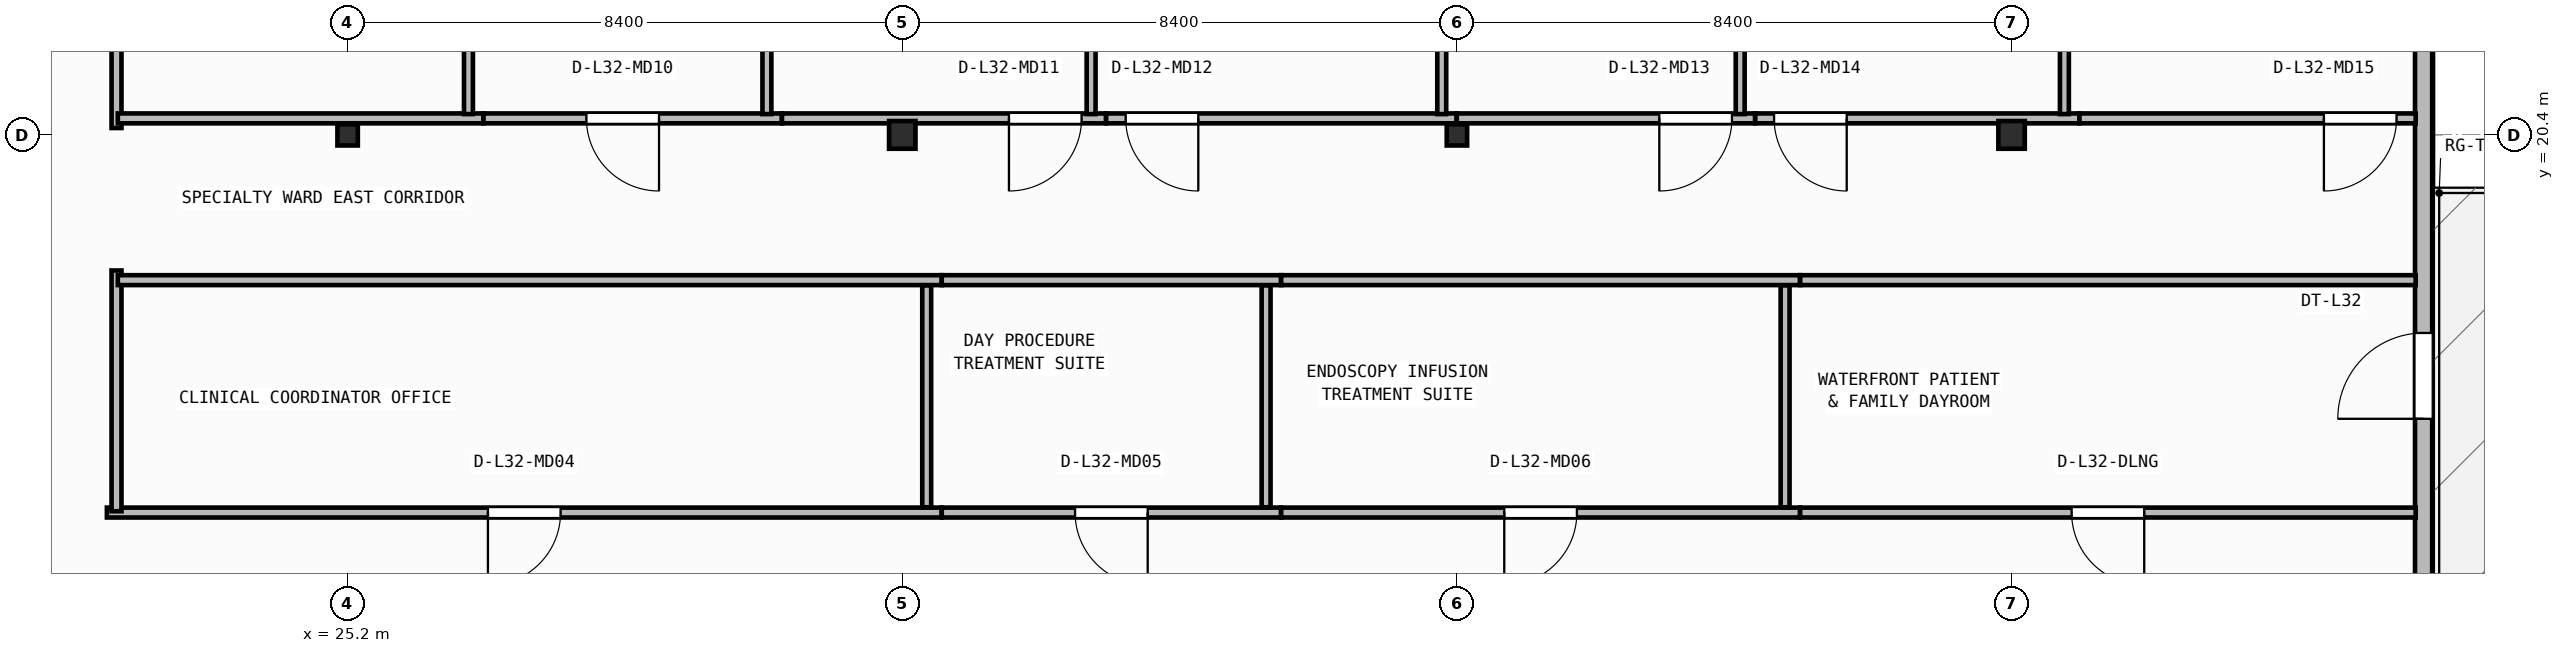
"""IFC4 building model, lengths in metres.
Left out: names, types, materials, properties, quantities, classifications, styles, units other than length and angle.
Written with IfcOpenShell. Run it as: python <this file> out.ifc"""

import sys

from ifc_helpers import new_model, si_unit, direction, frame, frame_2d, origin, origin_2d, place, context, subcontext, project, spatial, rectangle, i_section, extrude, element, fill, save


model = new_model("IFC4")
c1 = context("Model", 3, precision=1e-05, world=origin(), true_north=direction((0.0, 1.0)))
c2 = subcontext(c1, "Body", "Model", "MODEL_VIEW")
j1 = project(units=[si_unit("LENGTHUNIT", "METRE"), si_unit("PLANEANGLEUNIT", "RADIAN")], contexts=[c1])
p1 = place(None, origin())
s1 = spatial("IfcSite", under=j1, at=p1, CompositionType="ELEMENT")
p2 = place(p1, origin())
s2 = spatial("IfcBuilding", under=s1, at=p2, CompositionType="ELEMENT")
p3 = place(p2, frame((0.0, 0.0, 131.0)))
s3 = spatial("IfcBuildingStorey", under=s2, at=p3, CompositionType="ELEMENT", Elevation=131.0)
p4 = place(p3, frame((25.2, 20.4, 0.0), z_axis=(0.0, 0.0, 1.0), x_axis=(1.0, 0.0, 0.0)))
e1 = element("IfcColumn", 1, at=p4, inside=s3, PredefinedType="COLUMN", context=c2, shape_type="SweptSolid", body=[
    extrude(i_section(OverallWidth=0.309, OverallDepth=0.321, WebThickness=0.014, FlangeThickness=0.022, FilletRadius=0.017, at=origin_2d()), origin(), (0.0, 0.0, 1.0), 3.95),
])
p5 = place(p3, frame((33.6, 20.4, 0.0), z_axis=(0.0, 0.0, 1.0), x_axis=(1.0, 0.0, 0.0)))
e2 = element("IfcColumn", 2, at=p5, inside=s3, PredefinedType="COLUMN", context=c2, shape_type="SweptSolid", body=[
    extrude(i_section(OverallWidth=0.4, OverallDepth=0.42, WebThickness=0.025, FlangeThickness=0.04, at=origin_2d()), origin(), (0.0, 0.0, 1.0), 3.95),
])
p6 = place(p3, frame((42.0, 20.4, 0.0), z_axis=(0.0, 0.0, 1.0), x_axis=(1.0, 0.0, 0.0)))
e3 = element("IfcColumn", 3, at=p6, inside=s3, PredefinedType="COLUMN", context=c2, shape_type="SweptSolid", body=[
    extrude(i_section(OverallWidth=0.309, OverallDepth=0.321, WebThickness=0.014, FlangeThickness=0.022, FilletRadius=0.017, at=origin_2d()), origin(), (0.0, 0.0, 1.0), 3.95),
])
p7 = place(p3, frame((50.4, 20.4, 0.0), z_axis=(0.0, 0.0, 1.0), x_axis=(1.0, 0.0, 0.0)))
e4 = element("IfcColumn", 4, at=p7, inside=s3, PredefinedType="COLUMN", context=c2, shape_type="SweptSolid", body=[
    extrude(i_section(OverallWidth=0.4, OverallDepth=0.42, WebThickness=0.025, FlangeThickness=0.04, at=origin_2d()), origin(), (0.0, 0.0, 1.0), 3.95),
])
p8 = place(p3, frame((56.64, 6.86, 0.0), z_axis=(0.0, 0.0, 1.0), x_axis=(0.0, 1.0, 0.0)))
e5 = element("IfcWall", 5, at=p8, inside=s3, PredefinedType="STANDARD", context=c2, shape_type="SweptSolid", body=[
    extrude(rectangle(XDim=23.48, YDim=0.26, at=frame_2d((11.74, 0.0))), origin(), (0.0, 0.0, 1.0), 3.71),
])
p9 = place(p8, frame((9.24, 0.0, 0.0)))
e6 = element("IfcOpeningElement", 6, at=p9, cuts=e5, PredefinedType="OPENING", context=c2, shape_type="SweptSolid", body=[
    extrude(rectangle(XDim=1.3, YDim=2.15, at=frame_2d((0.65, 1.075))), frame((0.0, 0.14, 0.0), z_axis=(0.0, -1.0, 0.0), x_axis=(1.0, 0.0, 0.0)), (0.0, 0.0, 1.0), 0.28),
])
p10 = place(p3, frame((34.196, 14.68, 0.0), z_axis=(0.0, 0.0, 1.0), x_axis=(-1.0, 0.0, 0.0)))
e7 = element("IfcWall", 7, at=p10, inside=s3, PredefinedType="PARTITIONING", context=c2, shape_type="SweptSolid", body=[
    extrude(rectangle(XDim=12.642, YDim=0.15, at=frame_2d((6.321, 0.0))), origin(), (0.0, 0.0, 1.0), 3.71),
])
p11 = place(p10, frame((5.771, 0.0, 0.0)))
e8 = element("IfcOpeningElement", 8, at=p11, cuts=e7, PredefinedType="OPENING", context=c2, shape_type="SweptSolid", body=[
    extrude(rectangle(XDim=1.1, YDim=2.1, at=frame_2d((0.55, 1.05))), frame((0.0, 0.085, 0.0), z_axis=(0.0, -1.0, 0.0), x_axis=(1.0, 0.0, 0.0)), (0.0, 0.0, 1.0), 0.17),
])
p12 = place(p3, frame((39.336, 14.68, 0.0), z_axis=(0.0, 0.0, 1.0), x_axis=(-1.0, 0.0, 0.0)))
e9 = element("IfcWall", 9, at=p12, inside=s3, PredefinedType="PARTITIONING", context=c2, shape_type="SweptSolid", body=[
    extrude(rectangle(XDim=5.138, YDim=0.15, at=frame_2d((2.569, 0.0))), origin(), (0.0, 0.0, 1.0), 3.71),
])
p13 = place(p12, frame((2.019, 0.0, 0.0)))
e10 = element("IfcOpeningElement", 10, at=p13, cuts=e9, PredefinedType="OPENING", context=c2, shape_type="SweptSolid", body=[
    extrude(rectangle(XDim=1.1, YDim=2.1, at=frame_2d((0.55, 1.05))), frame((0.0, 0.085, 0.0), z_axis=(0.0, -1.0, 0.0), x_axis=(1.0, 0.0, 0.0)), (0.0, 0.0, 1.0), 0.17),
])
p14 = place(p3, frame((47.196, 14.68, 0.0), z_axis=(0.0, 0.0, 1.0), x_axis=(-1.0, 0.0, 0.0)))
e11 = element("IfcWall", 11, at=p14, inside=s3, PredefinedType="PARTITIONING", context=c2, shape_type="SweptSolid", body=[
    extrude(rectangle(XDim=7.858, YDim=0.15, at=frame_2d((3.929, 0.0))), origin(), (0.0, 0.0, 1.0), 3.71),
])
p15 = place(p14, frame((3.379, 0.0, 0.0)))
e12 = element("IfcOpeningElement", 12, at=p15, cuts=e11, PredefinedType="OPENING", context=c2, shape_type="SweptSolid", body=[
    extrude(rectangle(XDim=1.1, YDim=2.1, at=frame_2d((0.55, 1.05))), frame((0.0, 0.085, 0.0), z_axis=(0.0, -1.0, 0.0), x_axis=(1.0, 0.0, 0.0)), (0.0, 0.0, 1.0), 0.17),
])
p16 = place(p3, frame((56.52, 14.68, 0.0), z_axis=(0.0, 0.0, 1.0), x_axis=(-1.0, 0.0, 0.0)))
e13 = element("IfcWall", 13, at=p16, inside=s3, PredefinedType="PARTITIONING", context=c2, shape_type="SweptSolid", body=[
    extrude(rectangle(XDim=9.322, YDim=0.15, at=frame_2d((4.661, 0.0))), origin(), (0.0, 0.0, 1.0), 3.71),
])
p17 = place(p16, frame((4.111, 0.0, 0.0)))
e14 = element("IfcOpeningElement", 14, at=p17, cuts=e13, PredefinedType="OPENING", context=c2, shape_type="SweptSolid", body=[
    extrude(rectangle(XDim=1.1, YDim=2.1, at=frame_2d((0.55, 1.05))), frame((0.0, 0.085, 0.0), z_axis=(0.0, -1.0, 0.0), x_axis=(1.0, 0.0, 0.0)), (0.0, 0.0, 1.0), 0.17),
])
p18 = place(p3, frame((21.7, 14.7, 0.0), z_axis=(0.0, 0.0, 1.0), x_axis=(0.0, 1.0, 0.0)))
e15 = element("IfcWall", 15, at=p18, inside=s3, PredefinedType="PARTITIONING", context=c2, shape_type="SweptSolid", body=[
    extrude(rectangle(XDim=3.646, YDim=0.15, at=frame_2d((1.823, 0.0))), origin(), (0.0, 0.0, 1.0), 3.71),
])
p19 = place(p3, frame((21.7, 20.504, 0.0), z_axis=(0.0, 0.0, 1.0), x_axis=(0.0, 1.0, 0.0)))
e16 = element("IfcWall", 16, at=p19, inside=s3, PredefinedType="PARTITIONING", context=c2, shape_type="SweptSolid", body=[
    extrude(rectangle(XDim=6.756, YDim=0.15, at=frame_2d((3.378, 0.0))), origin(), (0.0, 0.0, 1.0), 3.71),
])
p20 = place(p19, frame((2.828, 0.0, 0.0)))
e17 = element("IfcOpeningElement", 17, at=p20, cuts=e16, PredefinedType="OPENING", context=c2, shape_type="SweptSolid", body=[
    extrude(rectangle(XDim=1.1, YDim=2.1, at=frame_2d((0.55, 1.05))), frame((0.0, 0.085, 0.0), z_axis=(0.0, -1.0, 0.0), x_axis=(1.0, 0.0, 0.0)), (0.0, 0.0, 1.0), 0.17),
])
p21 = place(p3, frame((21.72, 18.2, 0.0), z_axis=(0.0, 0.0, 1.0), x_axis=(1.0, 0.0, 0.0)))
e18 = element("IfcWall", 18, at=p21, inside=s3, PredefinedType="PARTITIONING", context=c2, shape_type="SweptSolid", body=[
    extrude(rectangle(XDim=12.476, YDim=0.15, at=frame_2d((6.238, 0.0))), origin(), (0.0, 0.0, 1.0), 3.71),
])
p22 = place(p3, frame((34.198, 18.2, 0.0), z_axis=(0.0, 0.0, 1.0), x_axis=(1.0, 0.0, 0.0)))
e19 = element("IfcWall", 19, at=p22, inside=s3, PredefinedType="PARTITIONING", context=c2, shape_type="SweptSolid", body=[
    extrude(rectangle(XDim=5.138, YDim=0.15, at=frame_2d((2.569, 0.0))), origin(), (0.0, 0.0, 1.0), 3.71),
])
p23 = place(p3, frame((39.338, 18.2, 0.0), z_axis=(0.0, 0.0, 1.0), x_axis=(1.0, 0.0, 0.0)))
e20 = element("IfcWall", 20, at=p23, inside=s3, PredefinedType="PARTITIONING", context=c2, shape_type="SweptSolid", body=[
    extrude(rectangle(XDim=7.858, YDim=0.15, at=frame_2d((3.929, 0.0))), origin(), (0.0, 0.0, 1.0), 3.71),
])
p24 = place(p3, frame((47.198, 18.2, 0.0), z_axis=(0.0, 0.0, 1.0), x_axis=(1.0, 0.0, 0.0)))
e21 = element("IfcWall", 21, at=p24, inside=s3, PredefinedType="PARTITIONING", context=c2, shape_type="SweptSolid", body=[
    extrude(rectangle(XDim=9.322, YDim=0.15, at=frame_2d((4.661, 0.0))), origin(), (0.0, 0.0, 1.0), 3.71),
])
p25 = place(p3, frame((27.256, 20.65, 0.0), z_axis=(0.0, 0.0, 1.0), x_axis=(-1.0, 0.0, 0.0)))
e22 = element("IfcWall", 22, at=p25, inside=s3, PredefinedType="PARTITIONING", context=c2, shape_type="SweptSolid", body=[
    extrude(rectangle(XDim=5.536, YDim=0.15, at=frame_2d((2.768, 0.0))), origin(), (0.0, 0.0, 1.0), 3.083),
])
p26 = place(p3, frame((31.776, 20.65, 0.0), z_axis=(0.0, 0.0, 1.0), x_axis=(-1.0, 0.0, 0.0)))
e23 = element("IfcWall", 23, at=p26, inside=s3, PredefinedType="PARTITIONING", context=c2, shape_type="SweptSolid", body=[
    extrude(rectangle(XDim=4.518, YDim=0.15, at=frame_2d((2.259, 0.0))), origin(), (0.0, 0.0, 1.0), 3.083),
])
p27 = place(p26, frame((1.86, 0.0, 0.0)))
e24 = element("IfcOpeningElement", 24, at=p27, cuts=e23, PredefinedType="OPENING", context=c2, shape_type="SweptSolid", body=[
    extrude(rectangle(XDim=1.1, YDim=2.1, at=frame_2d((0.55, 1.05))), frame((0.0, 0.085, 0.0), z_axis=(0.0, -1.0, 0.0), x_axis=(1.0, 0.0, 0.0)), (0.0, 0.0, 1.0), 0.17),
])
p28 = place(p3, frame((36.686, 20.65, 0.0), z_axis=(0.0, 0.0, 1.0), x_axis=(-1.0, 0.0, 0.0)))
e25 = element("IfcWall", 25, at=p28, inside=s3, PredefinedType="PARTITIONING", context=c2, shape_type="SweptSolid", body=[
    extrude(rectangle(XDim=4.908, YDim=0.15, at=frame_2d((2.454, 0.0))), origin(), (0.0, 0.0, 1.0), 3.083),
])
p29 = place(p28, frame((0.37, 0.0, 0.0)))
e26 = element("IfcOpeningElement", 26, at=p29, cuts=e25, PredefinedType="OPENING", context=c2, shape_type="SweptSolid", body=[
    extrude(rectangle(XDim=1.1, YDim=2.1, at=frame_2d((0.55, 1.05))), frame((0.0, 0.085, 0.0), z_axis=(0.0, -1.0, 0.0), x_axis=(1.0, 0.0, 0.0)), (0.0, 0.0, 1.0), 0.17),
])
p30 = place(p3, frame((41.996, 20.65, 0.0), z_axis=(0.0, 0.0, 1.0), x_axis=(-1.0, 0.0, 0.0)))
e27 = element("IfcWall", 27, at=p30, inside=s3, PredefinedType="PARTITIONING", context=c2, shape_type="SweptSolid", body=[
    extrude(rectangle(XDim=5.308, YDim=0.15, at=frame_2d((2.654, 0.0))), origin(), (0.0, 0.0, 1.0), 3.083),
])
p31 = place(p30, frame((3.913, 0.0, 0.0)))
e28 = element("IfcOpeningElement", 28, at=p31, cuts=e27, PredefinedType="OPENING", context=c2, shape_type="SweptSolid", body=[
    extrude(rectangle(XDim=1.1, YDim=2.1, at=frame_2d((0.55, 1.05))), frame((0.0, 0.085, 0.0), z_axis=(0.0, -1.0, 0.0), x_axis=(1.0, 0.0, 0.0)), (0.0, 0.0, 1.0), 0.17),
])
p32 = place(p3, frame((46.516, 20.65, 0.0), z_axis=(0.0, 0.0, 1.0), x_axis=(-1.0, 0.0, 0.0)))
e29 = element("IfcWall", 29, at=p32, inside=s3, PredefinedType="PARTITIONING", context=c2, shape_type="SweptSolid", body=[
    extrude(rectangle(XDim=4.518, YDim=0.15, at=frame_2d((2.259, 0.0))), origin(), (0.0, 0.0, 1.0), 3.083),
])
p33 = place(p32, frame((0.351, 0.0, 0.0)))
e30 = element("IfcOpeningElement", 30, at=p33, cuts=e29, PredefinedType="OPENING", context=c2, shape_type="SweptSolid", body=[
    extrude(rectangle(XDim=1.1, YDim=2.1, at=frame_2d((0.55, 1.05))), frame((0.0, 0.085, 0.0), z_axis=(0.0, -1.0, 0.0), x_axis=(1.0, 0.0, 0.0)), (0.0, 0.0, 1.0), 0.17),
])
p34 = place(p3, frame((51.426, 20.65, 0.0), z_axis=(0.0, 0.0, 1.0), x_axis=(-1.0, 0.0, 0.0)))
e31 = element("IfcWall", 31, at=p34, inside=s3, PredefinedType="PARTITIONING", context=c2, shape_type="SweptSolid", body=[
    extrude(rectangle(XDim=4.908, YDim=0.15, at=frame_2d((2.454, 0.0))), origin(), (0.0, 0.0, 1.0), 3.083),
])
p35 = place(p34, frame((3.523, 0.0, 0.0)))
e32 = element("IfcOpeningElement", 32, at=p35, cuts=e31, PredefinedType="OPENING", context=c2, shape_type="SweptSolid", body=[
    extrude(rectangle(XDim=1.1, YDim=2.1, at=frame_2d((0.55, 1.05))), frame((0.0, 0.085, 0.0), z_axis=(0.0, -1.0, 0.0), x_axis=(1.0, 0.0, 0.0)), (0.0, 0.0, 1.0), 0.17),
])
p36 = place(p3, frame((56.52, 20.65, 0.0), z_axis=(0.0, 0.0, 1.0), x_axis=(-1.0, 0.0, 0.0)))
e33 = element("IfcWall", 33, at=p36, inside=s3, PredefinedType="PARTITIONING", context=c2, shape_type="SweptSolid", body=[
    extrude(rectangle(XDim=5.092, YDim=0.15, at=frame_2d((2.546, 0.0))), origin(), (0.0, 0.0, 1.0), 3.71),
])
p37 = place(p36, frame((0.29, 0.0, 0.0)))
e34 = element("IfcOpeningElement", 34, at=p37, cuts=e33, PredefinedType="OPENING", context=c2, shape_type="SweptSolid", body=[
    extrude(rectangle(XDim=1.1, YDim=2.1, at=frame_2d((0.55, 1.05))), frame((0.0, 0.085, 0.0), z_axis=(0.0, -1.0, 0.0), x_axis=(1.0, 0.0, 0.0)), (0.0, 0.0, 1.0), 0.17),
])
p38 = place(p3, frame((33.97, 14.76, 0.0), z_axis=(0.0, 0.0, 1.0), x_axis=(0.0, 1.0, 0.0)))
e35 = element("IfcWall", 35, at=p38, inside=s3, PredefinedType="PARTITIONING", context=c2, shape_type="SweptSolid", body=[
    extrude(rectangle(XDim=3.36, YDim=0.135, at=frame_2d((1.68, 0.0))), origin(), (0.0, 0.0, 1.0), 3.152),
])
for number, where, z_axis, x_axis in (
    (36, (39.11, 14.76, 0.0), (0.0, 0.0, 1.0), (0.0, 1.0, 0.0)),
    (37, (46.97, 14.76, 0.0), (0.0, 0.0, 1.0), (0.0, 1.0, 0.0)),
):
    element("IfcWall", number, at=place(p3, frame(where, z_axis=z_axis, x_axis=x_axis)), inside=s3, PredefinedType="PARTITIONING", context=c2, shape_type="SweptSolid", body=[
        extrude(rectangle(XDim=3.36, YDim=0.135, at=frame_2d((1.68, 0.0))), origin(), (0.0, 0.0, 1.0), 3.71),
    ])
for number, where, z_axis, x_axis in (
    (38, (27.03, 20.715, 0.0), (0.0, 0.0, 1.0), (0.0, 1.0, 0.0)),
    (39, (31.55, 20.715, 0.0), (0.0, 0.0, 1.0), (0.0, 1.0, 0.0)),
    (40, (36.46, 20.715, 0.0), (0.0, 0.0, 1.0), (0.0, 1.0, 0.0)),
):
    element("IfcWall", number, at=place(p3, frame(where, z_axis=z_axis, x_axis=x_axis)), inside=s3, PredefinedType="PARTITIONING", context=c2, shape_type="SweptSolid", body=[
        extrude(rectangle(XDim=6.385, YDim=0.135, at=frame_2d((3.192, 0.0))), origin(), (0.0, 0.0, 1.0), 3.71),
    ])
p39 = place(p3, frame((41.77, 20.715, 0.0), z_axis=(0.0, 0.0, 1.0), x_axis=(0.0, 1.0, 0.0)))
e41 = element("IfcWall", 41, at=p39, inside=s3, PredefinedType="PARTITIONING", context=c2, shape_type="SweptSolid", body=[
    extrude(rectangle(XDim=6.385, YDim=0.135, at=frame_2d((3.192, 0.0))), origin(), (0.0, 0.0, 1.0), 3.152),
])
for number, where, z_axis, x_axis in (
    (42, (46.29, 20.715, 0.0), (0.0, 0.0, 1.0), (0.0, 1.0, 0.0)),
    (43, (51.2, 20.715, 0.0), (0.0, 0.0, 1.0), (0.0, 1.0, 0.0)),
):
    element("IfcWall", number, at=place(p3, frame(where, z_axis=z_axis, x_axis=x_axis)), inside=s3, PredefinedType="PARTITIONING", context=c2, shape_type="SweptSolid", body=[
        extrude(rectangle(XDim=6.385, YDim=0.135, at=frame_2d((3.192, 0.0))), origin(), (0.0, 0.0, 1.0), 3.71),
    ])
p40 = place(p9, origin())
e44 = element("IfcDoor", 44, at=p40, inside=s3, OperationType="SINGLE_SWING_LEFT", PredefinedType="DOOR", context=c2, shape_type="SweptSolid", body=[
    extrude(rectangle(XDim=1.3, YDim=2.15, at=frame_2d((0.65, 1.075))), frame((0.0, 0.025, 0.0), z_axis=(0.0, -1.0, 0.0), x_axis=(1.0, 0.0, 0.0)), (0.0, 0.0, 1.0), 0.05),
])
fill(e6, e44)
p41 = place(p11, origin())
e45 = element("IfcDoor", 45, at=p41, inside=s3, OperationType="SINGLE_SWING_RIGHT", PredefinedType="DOOR", context=c2, shape_type="SweptSolid", body=[
    extrude(rectangle(XDim=1.1, YDim=2.1, at=frame_2d((0.55, 1.05))), frame((0.0, 0.025, 0.0), z_axis=(0.0, -1.0, 0.0), x_axis=(1.0, 0.0, 0.0)), (0.0, 0.0, 1.0), 0.05),
])
fill(e8, e45)
p42 = place(p13, origin())
e46 = element("IfcDoor", 46, at=p42, inside=s3, OperationType="SINGLE_SWING_LEFT", PredefinedType="DOOR", context=c2, shape_type="SweptSolid", body=[
    extrude(rectangle(XDim=1.1, YDim=2.1, at=frame_2d((0.55, 1.05))), frame((0.0, 0.025, 0.0), z_axis=(0.0, -1.0, 0.0), x_axis=(1.0, 0.0, 0.0)), (0.0, 0.0, 1.0), 0.05),
])
fill(e10, e46)
p43 = place(p15, origin())
e47 = element("IfcDoor", 47, at=p43, inside=s3, OperationType="SINGLE_SWING_RIGHT", PredefinedType="DOOR", context=c2, shape_type="SweptSolid", body=[
    extrude(rectangle(XDim=1.1, YDim=2.1, at=frame_2d((0.55, 1.05))), frame((0.0, 0.025, 0.0), z_axis=(0.0, -1.0, 0.0), x_axis=(1.0, 0.0, 0.0)), (0.0, 0.0, 1.0), 0.05),
])
fill(e12, e47)
p44 = place(p17, origin())
e48 = element("IfcDoor", 48, at=p44, inside=s3, OperationType="SINGLE_SWING_LEFT", PredefinedType="DOOR", context=c2, shape_type="SweptSolid", body=[
    extrude(rectangle(XDim=1.1, YDim=2.1, at=frame_2d((0.55, 1.05))), frame((0.0, 0.025, 0.0), z_axis=(0.0, -1.0, 0.0), x_axis=(1.0, 0.0, 0.0)), (0.0, 0.0, 1.0), 0.05),
])
fill(e14, e48)
p45 = place(p27, origin())
e49 = element("IfcDoor", 49, at=p45, inside=s3, OperationType="SINGLE_SWING_LEFT", PredefinedType="DOOR", context=c2, shape_type="SweptSolid", body=[
    extrude(rectangle(XDim=1.1, YDim=2.1, at=frame_2d((0.55, 1.05))), frame((0.0, 0.025, 0.0), z_axis=(0.0, -1.0, 0.0), x_axis=(1.0, 0.0, 0.0)), (0.0, 0.0, 1.0), 0.05),
])
fill(e24, e49)
p46 = place(p29, origin())
e50 = element("IfcDoor", 50, at=p46, inside=s3, OperationType="SINGLE_SWING_RIGHT", PredefinedType="DOOR", context=c2, shape_type="SweptSolid", body=[
    extrude(rectangle(XDim=1.1, YDim=2.1, at=frame_2d((0.55, 1.05))), frame((0.0, 0.025, 0.0), z_axis=(0.0, -1.0, 0.0), x_axis=(1.0, 0.0, 0.0)), (0.0, 0.0, 1.0), 0.05),
])
fill(e26, e50)
p47 = place(p31, origin())
e51 = element("IfcDoor", 51, at=p47, inside=s3, OperationType="SINGLE_SWING_LEFT", PredefinedType="DOOR", context=c2, shape_type="SweptSolid", body=[
    extrude(rectangle(XDim=1.1, YDim=2.1, at=frame_2d((0.55, 1.05))), frame((0.0, 0.025, 0.0), z_axis=(0.0, -1.0, 0.0), x_axis=(1.0, 0.0, 0.0)), (0.0, 0.0, 1.0), 0.05),
])
fill(e28, e51)
p48 = place(p33, origin())
e52 = element("IfcDoor", 52, at=p48, inside=s3, OperationType="SINGLE_SWING_RIGHT", PredefinedType="DOOR", context=c2, shape_type="SweptSolid", body=[
    extrude(rectangle(XDim=1.1, YDim=2.1, at=frame_2d((0.55, 1.05))), frame((0.0, 0.025, 0.0), z_axis=(0.0, -1.0, 0.0), x_axis=(1.0, 0.0, 0.0)), (0.0, 0.0, 1.0), 0.05),
])
fill(e30, e52)
p49 = place(p35, origin())
e53 = element("IfcDoor", 53, at=p49, inside=s3, OperationType="SINGLE_SWING_LEFT", PredefinedType="DOOR", context=c2, shape_type="SweptSolid", body=[
    extrude(rectangle(XDim=1.1, YDim=2.1, at=frame_2d((0.55, 1.05))), frame((0.0, 0.025, 0.0), z_axis=(0.0, -1.0, 0.0), x_axis=(1.0, 0.0, 0.0)), (0.0, 0.0, 1.0), 0.05),
])
fill(e32, e53)
p50 = place(p37, origin())
e54 = element("IfcDoor", 54, at=p50, inside=s3, OperationType="SINGLE_SWING_RIGHT", PredefinedType="DOOR", context=c2, shape_type="SweptSolid", body=[
    extrude(rectangle(XDim=1.1, YDim=2.1, at=frame_2d((0.55, 1.05))), frame((0.0, 0.025, 0.0), z_axis=(0.0, -1.0, 0.0), x_axis=(1.0, 0.0, 0.0)), (0.0, 0.0, 1.0), 0.05),
])
fill(e34, e54)
save(model, sys.argv[1])
